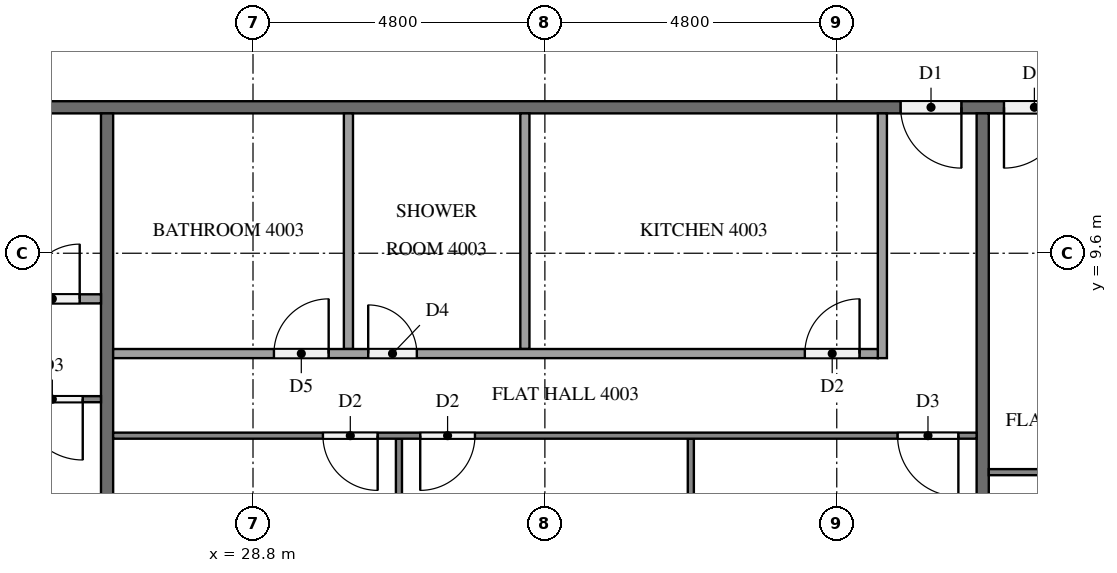
"""IFC4 building model, lengths in metres.
Left out: names, types, materials, properties, quantities, classifications, styles, units other than length and angle.
Written with IfcOpenShell. Run it as: python <this file> out.ifc"""

import sys

from ifc_helpers import new_model, si_unit, direction, frame, frame_2d, origin, place, context, subcontext, project, spatial, rectangle, extrude, element, fill, save


model = new_model("IFC4")
c1 = context("Model", 3, precision=1e-05, world=origin(), true_north=direction((0.0, 1.0)))
c2 = subcontext(c1, "Body", "Model", "MODEL_VIEW")
j1 = project(units=[si_unit("LENGTHUNIT", "METRE"), si_unit("PLANEANGLEUNIT", "RADIAN")], contexts=[c1])
p1 = place(None, origin())
s1 = spatial("IfcSite", under=j1, at=p1, CompositionType="ELEMENT")
p2 = place(p1, origin())
s2 = spatial("IfcBuilding", under=s1, at=p2, CompositionType="ELEMENT")
p3 = place(p2, frame((0.0, 0.0, 156.0)))
s3 = spatial("IfcBuildingStorey", under=s2, at=p3, CompositionType="ELEMENT", Elevation=156.0)
p4 = place(p3, frame((50.5, 12.0, 0.0), z_axis=(0.0, 0.0, 1.0), x_axis=(-1.0, 0.0, 0.0)))
e1 = element("IfcWall", 1, at=p4, inside=s3, PredefinedType="PARTITIONING", context=c2, shape_type="SweptSolid", body=[
    extrude(rectangle(XDim=38.6, YDim=0.2, at=frame_2d((19.3, 0.0))), origin(), (0.0, 0.0, 1.0), 3.2),
])
p5 = place(p4, frame((36.45, 0.0, 0.0)))
e2 = element("IfcOpeningElement", 2, at=p5, cuts=e1, PredefinedType="OPENING", context=c2, shape_type="SweptSolid", body=[
    extrude(rectangle(XDim=1.0, YDim=2.1, at=frame_2d((0.5, 1.05))), frame((0.0, 0.11, 0.0), z_axis=(0.0, -1.0, 0.0), x_axis=(1.0, 0.0, 0.0)), (0.0, 0.0, 1.0), 0.22),
])
p6 = place(p4, frame((34.75, 0.0, 0.0)))
e3 = element("IfcOpeningElement", 3, at=p6, cuts=e1, PredefinedType="OPENING", context=c2, shape_type="SweptSolid", body=[
    extrude(rectangle(XDim=1.0, YDim=2.1, at=frame_2d((0.5, 1.05))), frame((0.0, 0.11, 0.0), z_axis=(0.0, -1.0, 0.0), x_axis=(1.0, 0.0, 0.0)), (0.0, 0.0, 1.0), 0.22),
])
p7 = place(p4, frame((10.05, 0.0, 0.0)))
e4 = element("IfcOpeningElement", 4, at=p7, cuts=e1, PredefinedType="OPENING", context=c2, shape_type="SweptSolid", body=[
    extrude(rectangle(XDim=1.0, YDim=2.1, at=frame_2d((0.5, 1.05))), frame((0.0, 0.11, 0.0), z_axis=(0.0, -1.0, 0.0), x_axis=(1.0, 0.0, 0.0)), (0.0, 0.0, 1.0), 0.22),
])
p8 = place(p4, frame((8.35, 0.0, 0.0)))
e5 = element("IfcOpeningElement", 5, at=p8, cuts=e1, PredefinedType="OPENING", context=c2, shape_type="SweptSolid", body=[
    extrude(rectangle(XDim=1.0, YDim=2.1, at=frame_2d((0.5, 1.05))), frame((0.0, 0.11, 0.0), z_axis=(0.0, -1.0, 0.0), x_axis=(1.0, 0.0, 0.0)), (0.0, 0.0, 1.0), 0.22),
])
for number, where, z_axis, x_axis in (
    (6, (26.4, 11.9, 0.0), (0.0, 0.0, 1.0), (0.0, -1.0, 0.0)),
    (7, (40.8, 11.9, 0.0), (0.0, 0.0, 1.0), (0.0, -1.0, 0.0)),
):
    element("IfcWall", number, at=place(p3, frame(where, z_axis=z_axis, x_axis=x_axis)), inside=s3, PredefinedType="PARTITIONING", context=c2, shape_type="SweptSolid", body=[
        extrude(rectangle(XDim=11.8, YDim=0.2, at=frame_2d((5.9, 0.0))), origin(), (0.0, 0.0, 1.0), 3.2),
    ])
p9 = place(p3, frame((26.3, 7.2, 0.0), z_axis=(0.0, 0.0, 1.0), x_axis=(-1.0, 0.0, 0.0)))
e8 = element("IfcWall", 8, at=p9, inside=s3, PredefinedType="PARTITIONING", context=c2, shape_type="SweptSolid", body=[
    extrude(rectangle(XDim=11.8, YDim=0.1, at=frame_2d((5.9, 0.0))), origin(), (0.0, 0.0, 1.0), 3.2),
])
p10 = place(p9, frame((10.6, 0.0, 0.0)))
e9 = element("IfcOpeningElement", 9, at=p10, cuts=e8, PredefinedType="OPENING", context=c2, shape_type="SweptSolid", body=[
    extrude(rectangle(XDim=0.9, YDim=2.1, at=frame_2d((0.45, 1.05))), frame((0.0, 0.06, 0.0), z_axis=(0.0, -1.0, 0.0), x_axis=(1.0, 0.0, 0.0)), (0.0, 0.0, 1.0), 0.12),
])
p11 = place(p9, frame((0.3, 0.0, 0.0)))
e10 = element("IfcOpeningElement", 10, at=p11, cuts=e8, PredefinedType="OPENING", context=c2, shape_type="SweptSolid", body=[
    extrude(rectangle(XDim=1.0, YDim=2.1, at=frame_2d((0.5, 1.05))), frame((0.0, 0.06, 0.0), z_axis=(0.0, -1.0, 0.0), x_axis=(1.0, 0.0, 0.0)), (0.0, 0.0, 1.0), 0.12),
])
p12 = place(p3, frame((16.125, 8.85, 0.0), z_axis=(0.0, 0.0, 1.0), x_axis=(1.0, 0.0, 0.0)))
e11 = element("IfcWall", 11, at=p12, inside=s3, PredefinedType="PARTITIONING", context=c2, shape_type="SweptSolid", body=[
    extrude(rectangle(XDim=10.175, YDim=0.15, at=frame_2d((5.087, 0.0))), origin(), (0.0, 0.0, 1.0), 3.2),
])
p13 = place(p12, frame((0.3, 0.0, 0.0)))
e12 = element("IfcOpeningElement", 12, at=p13, cuts=e11, PredefinedType="OPENING", context=c2, shape_type="SweptSolid", body=[
    extrude(rectangle(XDim=0.8, YDim=2.1, at=frame_2d((0.4, 1.05))), frame((0.0, 0.085, 0.0), z_axis=(0.0, -1.0, 0.0), x_axis=(1.0, 0.0, 0.0)), (0.0, 0.0, 1.0), 0.17),
])
p14 = place(p12, frame((8.925, 0.0, 0.0)))
e13 = element("IfcOpeningElement", 13, at=p14, cuts=e11, PredefinedType="OPENING", context=c2, shape_type="SweptSolid", body=[
    extrude(rectangle(XDim=0.9, YDim=2.1, at=frame_2d((0.45, 1.05))), frame((0.0, 0.085, 0.0), z_axis=(0.0, -1.0, 0.0), x_axis=(1.0, 0.0, 0.0)), (0.0, 0.0, 1.0), 0.17),
])
for number, where, z_axis, x_axis in (
    (14, (36.0, 6.55, 0.0), (0.0, 0.0, 1.0), (0.0, -1.0, 0.0)),
    (15, (31.2, 6.55, 0.0), (0.0, 0.0, 1.0), (0.0, -1.0, 0.0)),
):
    element("IfcWall", number, at=place(p3, frame(where, z_axis=z_axis, x_axis=x_axis)), inside=s3, PredefinedType="PARTITIONING", context=c2, shape_type="SweptSolid", body=[
        extrude(rectangle(XDim=6.45, YDim=0.1, at=frame_2d((3.225, 0.0))), origin(), (0.0, 0.0, 1.0), 3.2),
    ])
p15 = place(p3, frame((40.7, 6.6, 0.0), z_axis=(0.0, 0.0, 1.0), x_axis=(-1.0, 0.0, 0.0)))
e16 = element("IfcWall", 16, at=p15, inside=s3, PredefinedType="PARTITIONING", context=c2, shape_type="SweptSolid", body=[
    extrude(rectangle(XDim=14.2, YDim=0.1, at=frame_2d((7.1, 0.0))), origin(), (0.0, 0.0, 1.0), 3.2),
])
p16 = place(p15, frame((0.3, 0.0, 0.0)))
e17 = element("IfcOpeningElement", 17, at=p16, cuts=e16, PredefinedType="OPENING", context=c2, shape_type="SweptSolid", body=[
    extrude(rectangle(XDim=1.0, YDim=2.1, at=frame_2d((0.5, 1.05))), frame((0.0, 0.06, 0.0), z_axis=(0.0, -1.0, 0.0), x_axis=(1.0, 0.0, 0.0)), (0.0, 0.0, 1.0), 0.12),
])
p17 = place(p15, frame((8.25, 0.0, 0.0)))
e18 = element("IfcOpeningElement", 18, at=p17, cuts=e16, PredefinedType="OPENING", context=c2, shape_type="SweptSolid", body=[
    extrude(rectangle(XDim=0.9, YDim=2.1, at=frame_2d((0.45, 1.05))), frame((0.0, 0.06, 0.0), z_axis=(0.0, -1.0, 0.0), x_axis=(1.0, 0.0, 0.0)), (0.0, 0.0, 1.0), 0.12),
])
p18 = place(p15, frame((9.85, 0.0, 0.0)))
e19 = element("IfcOpeningElement", 19, at=p18, cuts=e16, PredefinedType="OPENING", context=c2, shape_type="SweptSolid", body=[
    extrude(rectangle(XDim=0.9, YDim=2.1, at=frame_2d((0.45, 1.05))), frame((0.0, 0.06, 0.0), z_axis=(0.0, -1.0, 0.0), x_axis=(1.0, 0.0, 0.0)), (0.0, 0.0, 1.0), 0.12),
])
for number, where, z_axis, x_axis in (
    (20, (33.271, 11.9, 0.0), (0.0, 0.0, 1.0), (0.0, -1.0, 0.0)),
    (21, (30.369, 11.9, 0.0), (0.0, 0.0, 1.0), (0.0, -1.0, 0.0)),
):
    element("IfcWall", number, at=place(p3, frame(where, z_axis=z_axis, x_axis=x_axis)), inside=s3, PredefinedType="PARTITIONING", context=c2, shape_type="SweptSolid", body=[
        extrude(rectangle(XDim=3.875, YDim=0.15, at=frame_2d((1.938, 0.0))), origin(), (0.0, 0.0, 1.0), 3.2),
    ])
p19 = place(p3, frame((39.15, 11.9, 0.0), z_axis=(0.0, 0.0, 1.0), x_axis=(0.0, -1.0, 0.0)))
e22 = element("IfcWall", 22, at=p19, inside=s3, PredefinedType="PARTITIONING", context=c2, shape_type="SweptSolid", body=[
    extrude(rectangle(XDim=4.025, YDim=0.15, at=frame_2d((2.012, 0.0))), origin(), (0.0, 0.0, 1.0), 3.2),
])
p20 = place(p3, frame((26.5, 7.95, 0.0), z_axis=(0.0, 0.0, 1.0), x_axis=(1.0, 0.0, 0.0)))
e23 = element("IfcWall", 23, at=p20, inside=s3, PredefinedType="PARTITIONING", context=c2, shape_type="SweptSolid", body=[
    extrude(rectangle(XDim=12.575, YDim=0.15, at=frame_2d((6.288, 0.0))), origin(), (0.0, 0.0, 1.0), 3.2),
])
p21 = place(p20, frame((11.375, 0.0, 0.0)))
e24 = element("IfcOpeningElement", 24, at=p21, cuts=e23, PredefinedType="OPENING", context=c2, shape_type="SweptSolid", body=[
    extrude(rectangle(XDim=0.9, YDim=2.1, at=frame_2d((0.45, 1.05))), frame((0.0, 0.085, 0.0), z_axis=(0.0, -1.0, 0.0), x_axis=(1.0, 0.0, 0.0)), (0.0, 0.0, 1.0), 0.17),
])
p22 = place(p20, frame((4.194, 0.0, 0.0)))
e25 = element("IfcOpeningElement", 25, at=p22, cuts=e23, PredefinedType="OPENING", context=c2, shape_type="SweptSolid", body=[
    extrude(rectangle(XDim=0.8, YDim=2.1, at=frame_2d((0.4, 1.05))), frame((0.0, 0.085, 0.0), z_axis=(0.0, -1.0, 0.0), x_axis=(1.0, 0.0, 0.0)), (0.0, 0.0, 1.0), 0.17),
])
p23 = place(p20, frame((2.644, 0.0, 0.0)))
e26 = element("IfcOpeningElement", 26, at=p23, cuts=e23, PredefinedType="OPENING", context=c2, shape_type="SweptSolid", body=[
    extrude(rectangle(XDim=0.9, YDim=2.1, at=frame_2d((0.45, 1.05))), frame((0.0, 0.085, 0.0), z_axis=(0.0, -1.0, 0.0), x_axis=(1.0, 0.0, 0.0)), (0.0, 0.0, 1.0), 0.17),
])
p24 = place(p3, frame((57.5, 6.0, 0.0), z_axis=(0.0, 0.0, 1.0), x_axis=(-1.0, 0.0, 0.0)))
e27 = element("IfcWall", 27, at=p24, inside=s3, PredefinedType="PARTITIONING", context=c2, shape_type="SweptSolid", body=[
    extrude(rectangle(XDim=16.6, YDim=0.1, at=frame_2d((8.3, 0.0))), origin(), (0.0, 0.0, 1.0), 3.2),
])
p25 = place(p24, frame((9.85, 0.0, 0.0)))
e28 = element("IfcOpeningElement", 28, at=p25, cuts=e27, PredefinedType="OPENING", context=c2, shape_type="SweptSolid", body=[
    extrude(rectangle(XDim=1.0, YDim=2.1, at=frame_2d((0.5, 1.05))), frame((0.0, 0.06, 0.0), z_axis=(0.0, -1.0, 0.0), x_axis=(1.0, 0.0, 0.0)), (0.0, 0.0, 1.0), 0.12),
])
p26 = place(p24, frame((8.25, 0.0, 0.0)))
e29 = element("IfcOpeningElement", 29, at=p26, cuts=e27, PredefinedType="OPENING", context=c2, shape_type="SweptSolid", body=[
    extrude(rectangle(XDim=0.9, YDim=2.1, at=frame_2d((0.45, 1.05))), frame((0.0, 0.06, 0.0), z_axis=(0.0, -1.0, 0.0), x_axis=(1.0, 0.0, 0.0)), (0.0, 0.0, 1.0), 0.12),
])
p27 = place(p24, frame((0.5, 0.0, 0.0)))
e30 = element("IfcOpeningElement", 30, at=p27, cuts=e27, PredefinedType="OPENING", context=c2, shape_type="SweptSolid", body=[
    extrude(rectangle(XDim=0.9, YDim=2.1, at=frame_2d((0.45, 1.05))), frame((0.0, 0.06, 0.0), z_axis=(0.0, -1.0, 0.0), x_axis=(1.0, 0.0, 0.0)), (0.0, 0.0, 1.0), 0.12),
])
p28 = place(p7, origin())
e31 = element("IfcDoor", 31, at=p28, inside=s3, OperationType="SINGLE_SWING_LEFT", PredefinedType="DOOR", context=c2, shape_type="SweptSolid", body=[
    extrude(rectangle(XDim=1.0, YDim=2.1, at=frame_2d((0.5, 1.05))), frame((0.0, 0.025, 0.0), z_axis=(0.0, -1.0, 0.0), x_axis=(1.0, 0.0, 0.0)), (0.0, 0.0, 1.0), 0.05),
])
fill(e4, e31)
p29 = place(p8, origin())
e32 = element("IfcDoor", 32, at=p29, inside=s3, OperationType="SINGLE_SWING_RIGHT", PredefinedType="DOOR", context=c2, shape_type="SweptSolid", body=[
    extrude(rectangle(XDim=1.0, YDim=2.1, at=frame_2d((0.5, 1.05))), frame((0.0, 0.025, 0.0), z_axis=(0.0, -1.0, 0.0), x_axis=(1.0, 0.0, 0.0)), (0.0, 0.0, 1.0), 0.05),
])
fill(e5, e32)
p30 = place(p11, origin())
e33 = element("IfcDoor", 33, at=p30, inside=s3, OperationType="SINGLE_SWING_LEFT", PredefinedType="DOOR", context=c2, shape_type="SweptSolid", body=[
    extrude(rectangle(XDim=1.0, YDim=2.1, at=frame_2d((0.5, 1.05))), frame((0.0, 0.025, 0.0), z_axis=(0.0, -1.0, 0.0), x_axis=(1.0, 0.0, 0.0)), (0.0, 0.0, 1.0), 0.05),
])
fill(e10, e33)
p31 = place(p14, origin())
e34 = element("IfcDoor", 34, at=p31, inside=s3, OperationType="SINGLE_SWING_RIGHT", PredefinedType="DOOR", context=c2, shape_type="SweptSolid", body=[
    extrude(rectangle(XDim=0.9, YDim=2.1, at=frame_2d((0.45, 1.05))), frame((0.0, 0.025, 0.0), z_axis=(0.0, -1.0, 0.0), x_axis=(1.0, 0.0, 0.0)), (0.0, 0.0, 1.0), 0.05),
])
fill(e13, e34)
p32 = place(p16, origin())
e35 = element("IfcDoor", 35, at=p32, inside=s3, OperationType="SINGLE_SWING_LEFT", PredefinedType="DOOR", context=c2, shape_type="SweptSolid", body=[
    extrude(rectangle(XDim=1.0, YDim=2.1, at=frame_2d((0.5, 1.05))), frame((0.0, 0.025, 0.0), z_axis=(0.0, -1.0, 0.0), x_axis=(1.0, 0.0, 0.0)), (0.0, 0.0, 1.0), 0.05),
])
fill(e17, e35)
p33 = place(p17, origin())
e36 = element("IfcDoor", 36, at=p33, inside=s3, OperationType="SINGLE_SWING_RIGHT", PredefinedType="DOOR", context=c2, shape_type="SweptSolid", body=[
    extrude(rectangle(XDim=0.9, YDim=2.1, at=frame_2d((0.45, 1.05))), frame((0.0, 0.025, 0.0), z_axis=(0.0, -1.0, 0.0), x_axis=(1.0, 0.0, 0.0)), (0.0, 0.0, 1.0), 0.05),
])
fill(e18, e36)
p34 = place(p18, origin())
e37 = element("IfcDoor", 37, at=p34, inside=s3, OperationType="SINGLE_SWING_LEFT", PredefinedType="DOOR", context=c2, shape_type="SweptSolid", body=[
    extrude(rectangle(XDim=0.9, YDim=2.1, at=frame_2d((0.45, 1.05))), frame((0.0, 0.025, 0.0), z_axis=(0.0, -1.0, 0.0), x_axis=(1.0, 0.0, 0.0)), (0.0, 0.0, 1.0), 0.05),
])
fill(e19, e37)
p35 = place(p21, origin())
e38 = element("IfcDoor", 38, at=p35, inside=s3, OperationType="SINGLE_SWING_RIGHT", PredefinedType="DOOR", context=c2, shape_type="SweptSolid", body=[
    extrude(rectangle(XDim=0.9, YDim=2.1, at=frame_2d((0.45, 1.05))), frame((0.0, 0.025, 0.0), z_axis=(0.0, -1.0, 0.0), x_axis=(1.0, 0.0, 0.0)), (0.0, 0.0, 1.0), 0.05),
])
fill(e24, e38)
p36 = place(p22, origin())
e39 = element("IfcDoor", 39, at=p36, inside=s3, OperationType="SINGLE_SWING_LEFT", PredefinedType="DOOR", context=c2, shape_type="SweptSolid", body=[
    extrude(rectangle(XDim=0.8, YDim=2.1, at=frame_2d((0.4, 1.05))), frame((0.0, 0.025, 0.0), z_axis=(0.0, -1.0, 0.0), x_axis=(1.0, 0.0, 0.0)), (0.0, 0.0, 1.0), 0.05),
])
fill(e25, e39)
p37 = place(p23, origin())
e40 = element("IfcDoor", 40, at=p37, inside=s3, OperationType="SINGLE_SWING_RIGHT", PredefinedType="DOOR", context=c2, shape_type="SweptSolid", body=[
    extrude(rectangle(XDim=0.9, YDim=2.1, at=frame_2d((0.45, 1.05))), frame((0.0, 0.025, 0.0), z_axis=(0.0, -1.0, 0.0), x_axis=(1.0, 0.0, 0.0)), (0.0, 0.0, 1.0), 0.05),
])
fill(e26, e40)
save(model, sys.argv[1])
